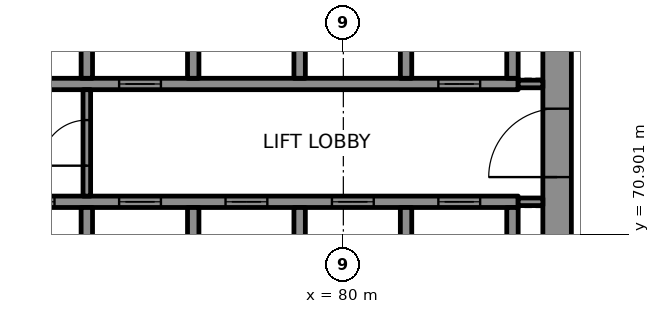
"""IFC4 building model, lengths in metres.
Left out: names, types, materials, properties, quantities, classifications, styles, units other than length and angle.
Written with IfcOpenShell. Run it as: python <this file> out.ifc"""

import sys

from ifc_helpers import new_model, si_unit, direction, frame, frame_2d, origin, place, context, subcontext, project, spatial, rectangle, extrude, element, fill, save


model = new_model("IFC4")
c1 = context("Model", 3, precision=1e-05, world=origin(), true_north=direction((0.0, 1.0)))
c2 = subcontext(c1, "Body", "Model", "MODEL_VIEW")
j1 = project(units=[si_unit("LENGTHUNIT", "METRE"), si_unit("PLANEANGLEUNIT", "RADIAN")], contexts=[c1])
p1 = place(None, origin())
s1 = spatial("IfcSite", under=j1, at=p1, CompositionType="ELEMENT")
p2 = place(p1, origin())
s2 = spatial("IfcBuilding", under=s1, at=p2, CompositionType="ELEMENT")
p3 = place(p2, frame((0.0, 0.0, 190.9)))
s3 = spatial("IfcBuildingStorey", under=s2, at=p3, CompositionType="ELEMENT", Elevation=190.9)
p4 = place(p3, frame((85.625, 67.75, 0.0), z_axis=(0.0, 0.0, 1.0), x_axis=(0.0, 1.0, 0.0)))
e1 = element("IfcWall", 1, at=p4, inside=s3, PredefinedType="SHEAR", context=c2, shape_type="SweptSolid", body=[
    extrude(rectangle(XDim=14.5, YDim=0.75, at=frame_2d((7.25, 0.0))), origin(), (0.0, 0.0, 1.0), 3.7),
])
p5 = place(p4, frame((4.65, 0.0, 0.0)))
e2 = element("IfcOpeningElement", 2, at=p5, cuts=e1, PredefinedType="OPENING", context=c2, shape_type="SweptSolid", body=[
    extrude(rectangle(XDim=1.8, YDim=2.1, at=frame_2d((0.9, 1.05))), frame((0.0, 0.385, 0.0), z_axis=(0.0, -1.0, 0.0), x_axis=(1.0, 0.0, 0.0)), (0.0, 0.0, 1.0), 0.77),
])
p6 = place(p4, frame((11.8, 0.0, 0.0)))
e3 = element("IfcOpeningElement", 3, at=p6, cuts=e1, PredefinedType="OPENING", context=c2, shape_type="SweptSolid", body=[
    extrude(rectangle(XDim=0.9, YDim=2.1, at=frame_2d((0.45, 1.05))), frame((0.0, 0.385, 0.0), z_axis=(0.0, -1.0, 0.0), x_axis=(1.0, 0.0, 0.0)), (0.0, 0.0, 1.0), 0.77),
])
p7 = place(p3, frame((70.3, 71.75, 0.0), z_axis=(0.0, 0.0, 1.0), x_axis=(1.0, 0.0, 0.0)))
e4 = element("IfcWall", 4, at=p7, inside=s3, PredefinedType="SHEAR", context=c2, shape_type="SweptSolid", body=[
    extrude(rectangle(XDim=14.3, YDim=0.3, at=frame_2d((7.15, 0.0))), origin(), (0.0, 0.0, 1.0), 3.7),
])
p8 = place(p7, frame((1.0, 0.0, 0.0)))
e5 = element("IfcOpeningElement", 5, at=p8, cuts=e4, PredefinedType="OPENING", context=c2, shape_type="SweptSolid", body=[
    extrude(rectangle(XDim=1.1, YDim=2.1, at=frame_2d((0.55, 1.05))), frame((0.0, 0.16, 0.0), z_axis=(0.0, -1.0, 0.0), x_axis=(1.0, 0.0, 0.0)), (0.0, 0.0, 1.0), 0.32),
])
p9 = place(p7, frame((3.8, 0.0, 0.0)))
e6 = element("IfcOpeningElement", 6, at=p9, cuts=e4, PredefinedType="OPENING", context=c2, shape_type="SweptSolid", body=[
    extrude(rectangle(XDim=1.1, YDim=2.1, at=frame_2d((0.55, 1.05))), frame((0.0, 0.16, 0.0), z_axis=(0.0, -1.0, 0.0), x_axis=(1.0, 0.0, 0.0)), (0.0, 0.0, 1.0), 0.32),
])
p10 = place(p7, frame((6.6, 0.0, 0.0)))
e7 = element("IfcOpeningElement", 7, at=p10, cuts=e4, PredefinedType="OPENING", context=c2, shape_type="SweptSolid", body=[
    extrude(rectangle(XDim=1.1, YDim=2.1, at=frame_2d((0.55, 1.05))), frame((0.0, 0.16, 0.0), z_axis=(0.0, -1.0, 0.0), x_axis=(1.0, 0.0, 0.0)), (0.0, 0.0, 1.0), 0.32),
])
p11 = place(p7, frame((9.4, 0.0, 0.0)))
e8 = element("IfcOpeningElement", 8, at=p11, cuts=e4, PredefinedType="OPENING", context=c2, shape_type="SweptSolid", body=[
    extrude(rectangle(XDim=1.1, YDim=2.1, at=frame_2d((0.55, 1.05))), frame((0.0, 0.16, 0.0), z_axis=(0.0, -1.0, 0.0), x_axis=(1.0, 0.0, 0.0)), (0.0, 0.0, 1.0), 0.32),
])
p12 = place(p7, frame((12.2, 0.0, 0.0)))
e9 = element("IfcOpeningElement", 9, at=p12, cuts=e4, PredefinedType="OPENING", context=c2, shape_type="SweptSolid", body=[
    extrude(rectangle(XDim=1.1, YDim=2.1, at=frame_2d((0.55, 1.05))), frame((0.0, 0.16, 0.0), z_axis=(0.0, -1.0, 0.0), x_axis=(1.0, 0.0, 0.0)), (0.0, 0.0, 1.0), 0.32),
])
p13 = place(p3, frame((70.3, 74.85, 0.0), z_axis=(0.0, 0.0, 1.0), x_axis=(1.0, 0.0, 0.0)))
e10 = element("IfcWall", 10, at=p13, inside=s3, PredefinedType="SHEAR", context=c2, shape_type="SweptSolid", body=[
    extrude(rectangle(XDim=14.3, YDim=0.3, at=frame_2d((7.15, 0.0))), origin(), (0.0, 0.0, 1.0), 3.7),
])
p14 = place(p13, frame((3.8, 0.0, 0.0)))
e11 = element("IfcOpeningElement", 11, at=p14, cuts=e10, PredefinedType="OPENING", context=c2, shape_type="SweptSolid", body=[
    extrude(rectangle(XDim=1.1, YDim=2.1, at=frame_2d((0.55, 1.05))), frame((0.0, 0.16, 0.0), z_axis=(0.0, -1.0, 0.0), x_axis=(1.0, 0.0, 0.0)), (0.0, 0.0, 1.0), 0.32),
])
p15 = place(p13, frame((12.2, 0.0, 0.0)))
e12 = element("IfcOpeningElement", 12, at=p15, cuts=e10, PredefinedType="OPENING", context=c2, shape_type="SweptSolid", body=[
    extrude(rectangle(XDim=1.1, YDim=2.1, at=frame_2d((0.55, 1.05))), frame((0.0, 0.16, 0.0), z_axis=(0.0, -1.0, 0.0), x_axis=(1.0, 0.0, 0.0)), (0.0, 0.0, 1.0), 0.32),
])
for number, where, z_axis, x_axis in (
    (13, (73.25, 69.0, 0.0), (0.0, 0.0, 1.0), (0.0, 1.0, 0.0)),
    (14, (73.25, 75.0, 0.0), (0.0, 0.0, 1.0), (0.0, 1.0, 0.0)),
    (15, (76.05, 69.0, 0.0), (0.0, 0.0, 1.0), (0.0, 1.0, 0.0)),
    (16, (76.05, 75.0, 0.0), (0.0, 0.0, 1.0), (0.0, 1.0, 0.0)),
    (17, (78.85, 69.0, 0.0), (0.0, 0.0, 1.0), (0.0, 1.0, 0.0)),
    (18, (78.85, 75.0, 0.0), (0.0, 0.0, 1.0), (0.0, 1.0, 0.0)),
    (19, (81.65, 69.0, 0.0), (0.0, 0.0, 1.0), (0.0, 1.0, 0.0)),
    (20, (81.65, 75.0, 0.0), (0.0, 0.0, 1.0), (0.0, 1.0, 0.0)),
    (21, (84.45, 69.0, 0.0), (0.0, 0.0, 1.0), (0.0, 1.0, 0.0)),
    (22, (84.45, 75.0, 0.0), (0.0, 0.0, 1.0), (0.0, 1.0, 0.0)),
):
    element("IfcWall", number, at=place(p3, frame(where, z_axis=z_axis, x_axis=x_axis)), inside=s3, PredefinedType="SHEAR", context=c2, shape_type="SweptSolid", body=[
        extrude(rectangle(XDim=2.6, YDim=0.3, at=frame_2d((1.3, 0.0))), origin(), (0.0, 0.0, 1.0), 3.7),
    ])
for number, where, z_axis, x_axis in (
    (23, (84.6, 71.75, 0.0), (0.0, 0.0, 1.0), (1.0, 0.0, 0.0)),
    (24, (84.6, 74.85, 0.0), (0.0, 0.0, 1.0), (1.0, 0.0, 0.0)),
):
    element("IfcWall", number, at=place(p3, frame(where, z_axis=z_axis, x_axis=x_axis)), inside=s3, PredefinedType="PARTITIONING", context=c2, shape_type="SweptSolid", body=[
        extrude(rectangle(XDim=0.65, YDim=0.2, at=frame_2d((0.325, 0.0))), origin(), (0.0, 0.0, 1.0), 3.7),
    ])
p16 = place(p3, frame((73.25, 71.9, 0.0), z_axis=(0.0, 0.0, 1.0), x_axis=(0.0, 1.0, 0.0)))
e25 = element("IfcWall", 25, at=p16, inside=s3, PredefinedType="PARTITIONING", context=c2, shape_type="SweptSolid", body=[
    extrude(rectangle(XDim=2.8, YDim=0.2, at=frame_2d((1.4, 0.0))), origin(), (0.0, 0.0, 1.0), 3.7),
])
p17 = place(p16, frame((0.8, 0.0, 0.0)))
e26 = element("IfcOpeningElement", 26, at=p17, cuts=e25, PredefinedType="OPENING", context=c2, shape_type="SweptSolid", body=[
    extrude(rectangle(XDim=1.2, YDim=2.1, at=frame_2d((0.6, 1.05))), frame((0.0, 0.11, 0.0), z_axis=(0.0, -1.0, 0.0), x_axis=(1.0, 0.0, 0.0)), (0.0, 0.0, 1.0), 0.22),
])
p18 = place(p8, origin())
e27 = element("IfcDoor", 27, at=p18, inside=s3, OperationType="DOUBLE_DOOR_SLIDING", PredefinedType="DOOR", context=c2, shape_type="SweptSolid", body=[
    extrude(rectangle(XDim=1.1, YDim=2.1, at=frame_2d((0.55, 1.05))), frame((0.0, 0.025, 0.0), z_axis=(0.0, -1.0, 0.0), x_axis=(1.0, 0.0, 0.0)), (0.0, 0.0, 1.0), 0.05),
])
fill(e5, e27)
p19 = place(p9, origin())
e28 = element("IfcDoor", 28, at=p19, inside=s3, OperationType="DOUBLE_DOOR_SLIDING", PredefinedType="DOOR", context=c2, shape_type="SweptSolid", body=[
    extrude(rectangle(XDim=1.1, YDim=2.1, at=frame_2d((0.55, 1.05))), frame((0.0, 0.025, 0.0), z_axis=(0.0, -1.0, 0.0), x_axis=(1.0, 0.0, 0.0)), (0.0, 0.0, 1.0), 0.05),
])
fill(e6, e28)
p20 = place(p10, origin())
e29 = element("IfcDoor", 29, at=p20, inside=s3, OperationType="DOUBLE_DOOR_SLIDING", PredefinedType="DOOR", context=c2, shape_type="SweptSolid", body=[
    extrude(rectangle(XDim=1.1, YDim=2.1, at=frame_2d((0.55, 1.05))), frame((0.0, 0.025, 0.0), z_axis=(0.0, -1.0, 0.0), x_axis=(1.0, 0.0, 0.0)), (0.0, 0.0, 1.0), 0.05),
])
fill(e7, e29)
p21 = place(p11, origin())
e30 = element("IfcDoor", 30, at=p21, inside=s3, OperationType="DOUBLE_DOOR_SLIDING", PredefinedType="DOOR", context=c2, shape_type="SweptSolid", body=[
    extrude(rectangle(XDim=1.1, YDim=2.1, at=frame_2d((0.55, 1.05))), frame((0.0, 0.025, 0.0), z_axis=(0.0, -1.0, 0.0), x_axis=(1.0, 0.0, 0.0)), (0.0, 0.0, 1.0), 0.05),
])
fill(e8, e30)
p22 = place(p12, origin())
e31 = element("IfcDoor", 31, at=p22, inside=s3, OperationType="DOUBLE_DOOR_SLIDING", PredefinedType="DOOR", context=c2, shape_type="SweptSolid", body=[
    extrude(rectangle(XDim=1.1, YDim=2.1, at=frame_2d((0.55, 1.05))), frame((0.0, 0.025, 0.0), z_axis=(0.0, -1.0, 0.0), x_axis=(1.0, 0.0, 0.0)), (0.0, 0.0, 1.0), 0.05),
])
fill(e9, e31)
p23 = place(p14, origin())
e32 = element("IfcDoor", 32, at=p23, inside=s3, OperationType="DOUBLE_DOOR_SLIDING", PredefinedType="DOOR", context=c2, shape_type="SweptSolid", body=[
    extrude(rectangle(XDim=1.1, YDim=2.1, at=frame_2d((0.55, 1.05))), frame((0.0, 0.025, 0.0), z_axis=(0.0, -1.0, 0.0), x_axis=(1.0, 0.0, 0.0)), (0.0, 0.0, 1.0), 0.05),
])
fill(e11, e32)
p24 = place(p15, origin())
e33 = element("IfcDoor", 33, at=p24, inside=s3, OperationType="DOUBLE_DOOR_SLIDING", PredefinedType="DOOR", context=c2, shape_type="SweptSolid", body=[
    extrude(rectangle(XDim=1.1, YDim=2.1, at=frame_2d((0.55, 1.05))), frame((0.0, 0.025, 0.0), z_axis=(0.0, -1.0, 0.0), x_axis=(1.0, 0.0, 0.0)), (0.0, 0.0, 1.0), 0.05),
])
fill(e12, e33)
p25 = place(p17, origin())
e34 = element("IfcDoor", 34, at=p25, inside=s3, OperationType="SINGLE_SWING_LEFT", PredefinedType="DOOR", context=c2, shape_type="SweptSolid", body=[
    extrude(rectangle(XDim=1.2, YDim=2.1, at=frame_2d((0.6, 1.05))), frame((0.0, 0.025, 0.0), z_axis=(0.0, -1.0, 0.0), x_axis=(1.0, 0.0, 0.0)), (0.0, 0.0, 1.0), 0.05),
])
fill(e26, e34)
p26 = place(p5, origin())
e35 = element("IfcDoor", 35, at=p26, inside=s3, OperationType="SINGLE_SWING_RIGHT", PredefinedType="DOOR", context=c2, shape_type="SweptSolid", body=[
    extrude(rectangle(XDim=1.8, YDim=2.1, at=frame_2d((0.9, 1.05))), frame((0.0, 0.095, 0.0), z_axis=(0.0, -1.0, 0.0), x_axis=(1.0, 0.0, 0.0)), (0.0, 0.0, 1.0), 0.19),
])
fill(e2, e35)
save(model, sys.argv[1])
